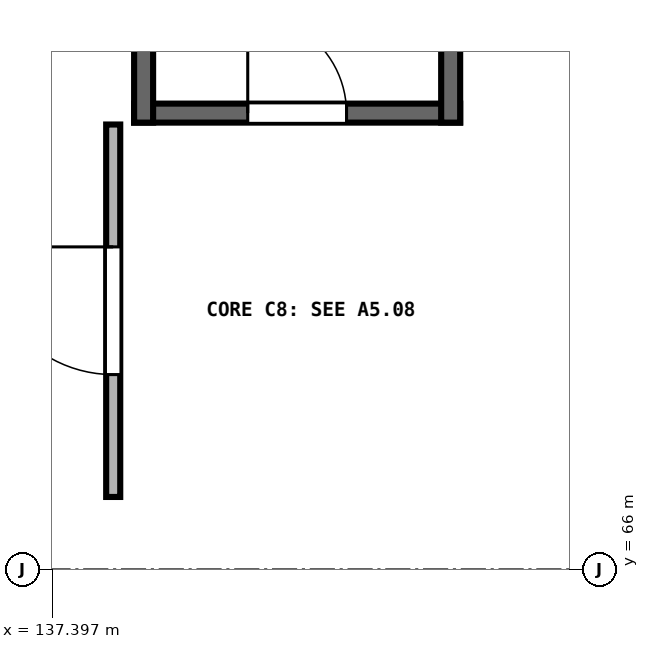
"""IFC4 building model, lengths in metres.
Left out: names, types, materials, properties, quantities, classifications, styles, units other than length and angle.
Written with IfcOpenShell. Run it as: python <this file> out.ifc"""

import sys

from ifc_helpers import new_model, si_unit, direction, frame, frame_2d, origin, place, context, subcontext, project, spatial, rectangle, extrude, element, fill, save


model = new_model("IFC4")
c1 = context("Model", 3, precision=1e-05, world=origin(), true_north=direction((0.0, 1.0)))
c2 = subcontext(c1, "Body", "Model", "MODEL_VIEW")
j1 = project(units=[si_unit("LENGTHUNIT", "METRE"), si_unit("PLANEANGLEUNIT", "RADIAN")], contexts=[c1])
p1 = place(None, origin())
s1 = spatial("IfcSite", under=j1, at=p1, CompositionType="ELEMENT")
p2 = place(p1, origin())
s2 = spatial("IfcBuilding", under=s1, at=p2, CompositionType="ELEMENT")
p3 = place(p2, frame((0.0, 0.0, 14.7)))
s3 = spatial("IfcBuildingStorey", under=s2, at=p3, CompositionType="ELEMENT", Elevation=14.7)
p4 = place(p3, frame((138.475, 72.0, 0.0), z_axis=(0.0, 0.0, 1.0), x_axis=(1.0, 0.0, 0.0)))
e1 = element("IfcWall", 1, at=p4, inside=s3, PredefinedType="SHEAR", context=c2, shape_type="SweptSolid", body=[
    extrude(rectangle(XDim=4.29, YDim=0.25, at=frame_2d((2.145, 0.0))), origin(), (0.0, 0.0, 1.0), 4.25),
])
p5 = place(p4, frame((1.495, 0.0, 0.0)))
e2 = element("IfcOpeningElement", 2, at=p5, cuts=e1, PredefinedType="OPENING", context=c2, shape_type="SweptSolid", body=[
    extrude(rectangle(XDim=1.3, YDim=2.18, at=frame_2d((0.65, 1.09))), frame((0.0, 0.135, 0.0), z_axis=(0.0, -1.0, 0.0), x_axis=(1.0, 0.0, 0.0)), (0.0, 0.0, 1.0), 0.27),
])
for number, where, z_axis, x_axis in (
    (3, (138.6, 71.875, 0.0), (0.0, 0.0, 1.0), (0.0, 1.0, 0.0)),
    (4, (142.64, 71.875, 0.0), (0.0, 0.0, 1.0), (0.0, 1.0, 0.0)),
):
    element("IfcWall", number, at=place(p3, frame(where, z_axis=z_axis, x_axis=x_axis)), inside=s3, PredefinedType="SHEAR", context=c2, shape_type="SweptSolid", body=[
        extrude(rectangle(XDim=11.09, YDim=0.25, at=frame_2d((5.545, 0.0))), origin(), (0.0, 0.0, 1.0), 4.25),
    ])
p6 = place(p3, frame((138.2, 66.95, 0.0), z_axis=(0.0, 0.0, 1.0), x_axis=(0.0, 1.0, 0.0)))
e5 = element("IfcWall", 5, at=p6, inside=s3, PredefinedType="PARTITIONING", context=c2, shape_type="SweptSolid", body=[
    extrude(rectangle(XDim=4.9, YDim=0.185, at=frame_2d((2.45, 0.0))), origin(), (0.0, 0.0, 1.0), 4.2),
])
p7 = place(p6, frame((1.61, 0.0, 0.0)))
e6 = element("IfcOpeningElement", 6, at=p7, cuts=e5, PredefinedType="OPENING", context=c2, shape_type="SweptSolid", body=[
    extrude(rectangle(XDim=1.68, YDim=2.25, at=frame_2d((0.84, 1.125))), frame((0.0, 0.103, 0.0), z_axis=(0.0, -1.0, 0.0), x_axis=(1.0, 0.0, 0.0)), (0.0, 0.0, 1.0), 0.205),
])
p8 = place(p5, origin())
e7 = element("IfcDoor", 7, at=p8, inside=s3, OperationType="SINGLE_SWING_LEFT", PredefinedType="DOOR", context=c2, shape_type="SweptSolid", body=[
    extrude(rectangle(XDim=1.3, YDim=2.18, at=frame_2d((0.65, 1.09))), frame((0.0, 0.025, 0.0), z_axis=(0.0, -1.0, 0.0), x_axis=(1.0, 0.0, 0.0)), (0.0, 0.0, 1.0), 0.05),
])
fill(e2, e7)
p9 = place(p7, origin())
e8 = element("IfcDoor", 8, at=p9, inside=s3, OperationType="SINGLE_SWING_RIGHT", PredefinedType="DOOR", context=c2, shape_type="SweptSolid", body=[
    extrude(rectangle(XDim=1.68, YDim=2.25, at=frame_2d((0.84, 1.125))), frame((0.0, 0.025, 0.0), z_axis=(0.0, -1.0, 0.0), x_axis=(1.0, 0.0, 0.0)), (0.0, 0.0, 1.0), 0.05),
])
fill(e6, e8)
save(model, sys.argv[1])
